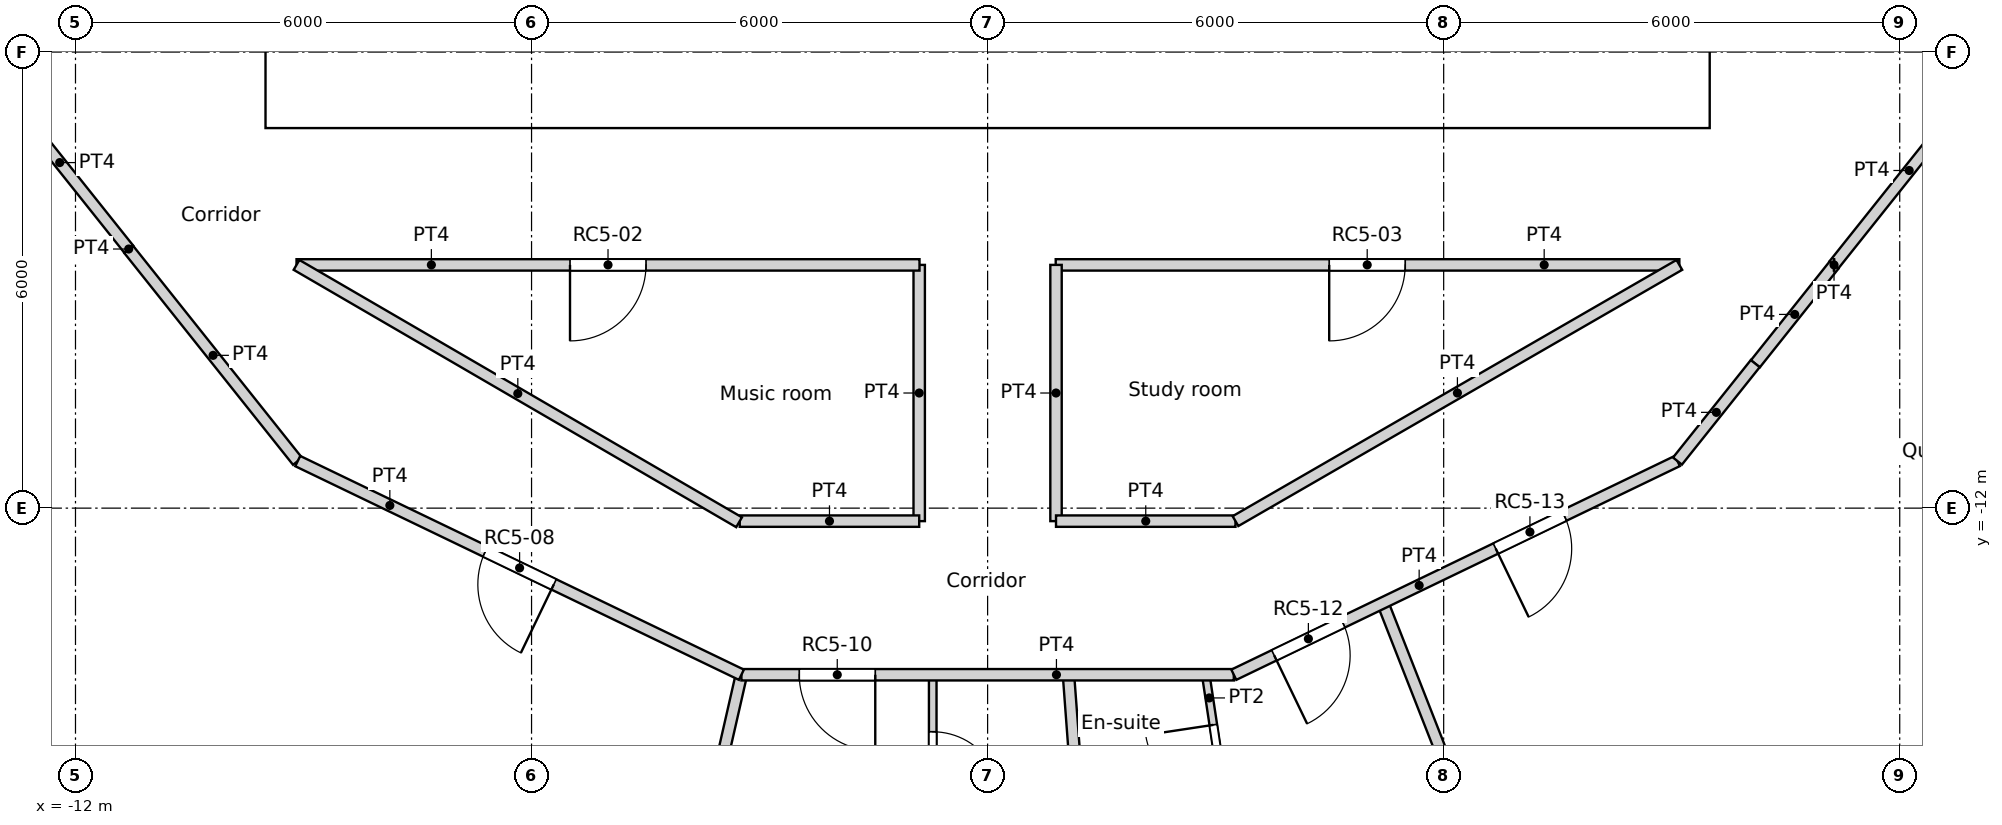
"""IFC4 building model, lengths in metres.
Left out: names, types, materials, properties, quantities, classifications, styles, units other than length and angle.
Written with IfcOpenShell. Run it as: python <this file> out.ifc"""

import sys

from ifc_helpers import new_model, si_unit, direction, frame, frame_2d, origin, origin_2d, place, context, subcontext, project, spatial, rectangle, circle, extrude, element, fill, save


model = new_model("IFC4")
c1 = context("Model", 3, precision=1e-05, world=origin(), true_north=direction((0.0, 1.0)))
c2 = subcontext(c1, "Body", "Model", "MODEL_VIEW")
j1 = project(units=[si_unit("LENGTHUNIT", "METRE"), si_unit("PLANEANGLEUNIT", "RADIAN")], contexts=[c1])
p1 = place(None, origin())
s1 = spatial("IfcSite", under=j1, at=p1, CompositionType="ELEMENT")
p2 = place(p1, origin())
s2 = spatial("IfcBuilding", under=s1, at=p2, CompositionType="ELEMENT")
p3 = place(p2, frame((0.0, 0.0, 270.6)))
s3 = spatial("IfcBuildingStorey", under=s2, at=p3, CompositionType="ELEMENT", Elevation=270.6)
p4 = place(p3, frame((11.735, -14.716, 0.0), z_axis=(0.0, 0.0, 1.0), x_axis=(1.0, 0.0, 0.0)))
e1 = element("IfcColumn", 1, at=p4, inside=s3, PredefinedType="COLUMN", context=c2, shape_type="SweptSolid", body=[
    extrude(circle(Radius=0.55, at=origin_2d()), origin(), (0.0, 0.0, 1.0), 3.6),
])
p5 = place(p3, frame((-9.5, -6.7, 0.0), z_axis=(0.0, 0.0, 1.0), x_axis=(1.0, 0.0, 0.0)))
e2 = element("IfcWall", 2, at=p5, inside=s3, PredefinedType="SOLIDWALL", context=c2, shape_type="SweptSolid", body=[
    extrude(rectangle(XDim=19.0, YDim=0.6, at=frame_2d((9.5, 0.0))), origin(), (0.0, 0.0, 1.0), 3.6),
])
p6 = place(p5, frame((10.4, 0.0, 0.0)))
e3 = element("IfcOpeningElement", 3, at=p6, cuts=e2, PredefinedType="OPENING", context=c2, shape_type="SweptSolid", body=[
    extrude(rectangle(XDim=1.0, YDim=2.1, at=frame_2d((0.5, 1.05))), frame((0.0, 0.3, 0.0), z_axis=(0.0, -1.0, 0.0), x_axis=(1.0, 0.0, 0.0)), (0.0, 0.0, 1.0), 0.6),
])
p7 = place(p5, frame((5.35, 0.0, 0.0)))
e4 = element("IfcOpeningElement", 4, at=p7, cuts=e2, PredefinedType="OPENING", context=c2, shape_type="SweptSolid", body=[
    extrude(rectangle(XDim=1.7, YDim=2.1, at=frame_2d((0.85, 1.05))), frame((0.0, 0.3, 0.0), z_axis=(0.0, -1.0, 0.0), x_axis=(1.0, 0.0, 0.0)), (0.0, 0.0, 1.0), 0.6),
])
p8 = place(p5, frame((11.95, 0.0, 0.0)))
e5 = element("IfcOpeningElement", 5, at=p8, cuts=e2, PredefinedType="OPENING", context=c2, shape_type="SweptSolid", body=[
    extrude(rectangle(XDim=1.7, YDim=2.1, at=frame_2d((0.85, 1.05))), frame((0.0, 0.3, 0.0), z_axis=(0.0, -1.0, 0.0), x_axis=(1.0, 0.0, 0.0)), (0.0, 0.0, 1.0), 0.6),
])
p9 = place(p3, frame((-9.2, -6.4, 0.0), z_axis=(0.0, 0.0, 1.0), x_axis=(0.0, 1.0, 0.0)))
e6 = element("IfcWall", 6, at=p9, inside=s3, PredefinedType="SOLIDWALL", context=c2, shape_type="SweptSolid", body=[
    extrude(rectangle(XDim=12.8, YDim=0.6, at=frame_2d((6.4, 0.0))), origin(), (0.0, 0.0, 1.0), 3.6),
])
p10 = place(p3, frame((9.2, -6.4, 0.0), z_axis=(0.0, 0.0, 1.0), x_axis=(0.0, 1.0, 0.0)))
e7 = element("IfcWall", 7, at=p10, inside=s3, PredefinedType="SOLIDWALL", context=c2, shape_type="SweptSolid", body=[
    extrude(rectangle(XDim=12.8, YDim=0.6, at=frame_2d((6.4, 0.0))), origin(), (0.0, 0.0, 1.0), 3.6),
])
p11 = place(p10, frame((6.4, 0.0, 0.0)))
e8 = element("IfcOpeningElement", 8, at=p11, cuts=e7, PredefinedType="OPENING", context=c2, shape_type="SweptSolid", body=[
    extrude(rectangle(XDim=1.8, YDim=2.1, at=frame_2d((0.9, 1.05))), frame((0.0, 0.3, 0.0), z_axis=(0.0, -1.0, 0.0), x_axis=(1.0, 0.0, 0.0)), (0.0, 0.0, 1.0), 0.6),
])
for number, where, z_axis, x_axis in (
    (9, (-2.25, -6.4, 0.0), (0.0, 0.0, 1.0), (0.0, 1.0, 0.0)),
    (10, (0.55, -6.4, 0.0), (0.0, 0.0, 1.0), (0.0, 1.0, 0.0)),
    (11, (2.25, -6.4, 0.0), (0.0, 0.0, 1.0), (0.0, 1.0, 0.0)),
):
    element("IfcWall", number, at=place(p3, frame(where, z_axis=z_axis, x_axis=x_axis)), inside=s3, PredefinedType="SOLIDWALL", context=c2, shape_type="SweptSolid", body=[
        extrude(rectangle(XDim=3.15, YDim=0.3, at=frame_2d((1.575, 0.0))), origin(), (0.0, 0.0, 1.0), 3.25),
    ])
p12 = place(p3, frame((-9.092, -8.8, 0.0), z_axis=(0.0, 0.0, 1.0), x_axis=(1.0, 0.0, 0.0)))
e12 = element("IfcWall", 12, at=p12, inside=s3, PredefinedType="PARTITIONING", context=c2, shape_type="SweptSolid", body=[
    extrude(rectangle(XDim=8.196, YDim=0.15, at=frame_2d((4.098, 0.0))), origin(), (0.0, 0.0, 1.0), 3.1),
])
p13 = place(p12, frame((3.598, 0.0, 0.0)))
e13 = element("IfcOpeningElement", 13, at=p13, cuts=e12, PredefinedType="OPENING", context=c2, shape_type="SweptSolid", body=[
    extrude(rectangle(XDim=1.0, YDim=2.04, at=frame_2d((0.5, 1.02))), frame((0.0, 0.075, 0.0), z_axis=(0.0, -1.0, 0.0), x_axis=(1.0, 0.0, 0.0)), (0.0, 0.0, 1.0), 0.15),
])
p14 = place(p3, frame((-9.092, -8.8, 0.0), z_axis=(0.0, 0.0, 1.0), x_axis=(0.864470922103, -0.502682827277, 0.0)))
e14 = element("IfcWall", 14, at=p14, inside=s3, PredefinedType="PARTITIONING", context=c2, shape_type="SweptSolid", body=[
    extrude(rectangle(XDim=6.735, YDim=0.15, at=frame_2d((3.368, 0.0))), origin(), (0.0, 0.0, 1.0), 3.1),
])
p15 = place(p3, frame((0.896, -8.8, 0.0), z_axis=(0.0, 0.0, 1.0), x_axis=(1.0, 0.0, 0.0)))
e15 = element("IfcWall", 15, at=p15, inside=s3, PredefinedType="PARTITIONING", context=c2, shape_type="SweptSolid", body=[
    extrude(rectangle(XDim=8.205, YDim=0.15, at=frame_2d((4.102, 0.0))), origin(), (0.0, 0.0, 1.0), 3.1),
])
p16 = place(p15, frame((3.598, 0.0, 0.0)))
e16 = element("IfcOpeningElement", 16, at=p16, cuts=e15, PredefinedType="OPENING", context=c2, shape_type="SweptSolid", body=[
    extrude(rectangle(XDim=1.0, YDim=2.04, at=frame_2d((0.5, 1.02))), frame((0.0, 0.075, 0.0), z_axis=(0.0, -1.0, 0.0), x_axis=(1.0, 0.0, 0.0)), (0.0, 0.0, 1.0), 0.15),
])
p17 = place(p3, frame((-11.3, -8.596, 0.0), z_axis=(0.0, 0.0, 1.0), x_axis=(0.623165080354, -0.782090328944, 0.0)))
e17 = element("IfcWall", 17, at=p17, inside=s3, PredefinedType="PARTITIONING", context=c2, shape_type="SweptSolid", body=[
    extrude(rectangle(XDim=3.564, YDim=0.15, at=frame_2d((1.782, 0.0))), origin(), (0.0, 0.0, 1.0), 3.1),
])
p18 = place(p3, frame((-11.3, -8.596, 0.0), z_axis=(0.0, 0.0, 1.0), x_axis=(0.0, 1.0, 0.0)))
e18 = element("IfcWall", 18, at=p18, inside=s3, PredefinedType="PARTITIONING", context=c2, shape_type="SweptSolid", body=[
    extrude(rectangle(XDim=0.01, YDim=0.15, at=frame_2d((0.005, 0.0))), origin(), (0.0, 0.0, 1.0), 3.1),
])
p19 = place(p3, frame((11.137, -8.8, 0.0), z_axis=(0.0, 0.0, 1.0), x_axis=(-1.0, 0.0, 0.0)))
e19 = element("IfcWall", 19, at=p19, inside=s3, PredefinedType="PARTITIONING", context=c2, shape_type="SweptSolid", body=[
    extrude(rectangle(XDim=0.003, YDim=0.15, at=frame_2d((0.001, 0.0))), origin(), (0.0, 0.0, 1.0), 3.1),
])
p20 = place(p3, frame((10.101, -10.101, 0.0), z_axis=(0.0, 0.0, 1.0), x_axis=(0.623098344652, 0.782143498913, 0.0)))
e20 = element("IfcWall", 20, at=p20, inside=s3, PredefinedType="PARTITIONING", context=c2, shape_type="SweptSolid", body=[
    extrude(rectangle(XDim=1.661, YDim=0.15, at=frame_2d((0.831, 0.0))), origin(), (0.0, 0.0, 1.0), 3.1),
])
p21 = place(p3, frame((11.134, -8.8, 0.0), z_axis=(0.0, 0.0, 1.0), x_axis=(0.623476099415, 0.781842409606, 0.0)))
e21 = element("IfcWall", 21, at=p21, inside=s3, PredefinedType="PARTITIONING", context=c2, shape_type="SweptSolid", body=[
    extrude(rectangle(XDim=3.177, YDim=0.15, at=frame_2d((1.589, 0.0))), origin(), (0.0, 0.0, 1.0), 3.1),
])
p22 = place(p3, frame((-13.115, -6.316, 0.0), z_axis=(0.0, 0.0, 1.0), x_axis=(0.623446514299, -0.781866001185, 0.0)))
e22 = element("IfcWall", 22, at=p22, inside=s3, PredefinedType="PARTITIONING", context=c2, shape_type="SweptSolid", body=[
    extrude(rectangle(XDim=2.911, YDim=0.15, at=frame_2d((1.456, 0.0))), origin(), (0.0, 0.0, 1.0), 3.1),
])
p23 = place(p3, frame((-3.261, -12.171, 0.0), z_axis=(0.0, 0.0, 1.0), x_axis=(1.0, 0.0, 0.0)))
e23 = element("IfcWall", 23, at=p23, inside=s3, PredefinedType="PARTITIONING", context=c2, shape_type="SweptSolid", body=[
    extrude(rectangle(XDim=2.361, YDim=0.15, at=frame_2d((1.181, 0.0))), origin(), (0.0, 0.0, 1.0), 3.1),
])
for number, where, z_axis, x_axis in (
    (24, (-0.9, -12.171, 0.0), (0.0, 0.0, 1.0), (0.0, 1.0, 0.0)),
    (25, (0.9, -12.171, 0.0), (0.0, 0.0, 1.0), (0.0, 1.0, 0.0)),
):
    element("IfcWall", number, at=place(p3, frame(where, z_axis=z_axis, x_axis=x_axis)), inside=s3, PredefinedType="PARTITIONING", context=c2, shape_type="SweptSolid", body=[
        extrude(rectangle(XDim=3.371, YDim=0.15, at=frame_2d((1.686, 0.0))), origin(), (0.0, 0.0, 1.0), 3.1),
    ])
p24 = place(p3, frame((0.9, -12.171, 0.0), z_axis=(0.0, 0.0, 1.0), x_axis=(1.0, 0.0, 0.0)))
e26 = element("IfcWall", 26, at=p24, inside=s3, PredefinedType="PARTITIONING", context=c2, shape_type="SweptSolid", body=[
    extrude(rectangle(XDim=2.361, YDim=0.15, at=frame_2d((1.181, 0.0))), origin(), (0.0, 0.0, 1.0), 3.1),
])
p25 = place(p3, frame((3.261, -12.171, 0.0), z_axis=(0.0, 0.0, 1.0), x_axis=(0.866066809554, 0.499928276245, 0.0)))
e27 = element("IfcWall", 27, at=p25, inside=s3, PredefinedType="PARTITIONING", context=c2, shape_type="SweptSolid", body=[
    extrude(rectangle(XDim=6.743, YDim=0.15, at=frame_2d((3.371, 0.0))), origin(), (0.0, 0.0, 1.0), 3.1),
])
p26 = place(p3, frame((-9.076, -11.381, 0.0), z_axis=(0.0, 0.0, 1.0), x_axis=(0.900976027191, -0.433868872388, 0.0)))
e28 = element("IfcWall", 28, at=p26, inside=s3, PredefinedType="PARTITIONING", context=c2, shape_type="SweptSolid", body=[
    extrude(rectangle(XDim=6.479, YDim=0.15, at=frame_2d((3.239, 0.0))), origin(), (0.0, 0.0, 1.0), 3.1),
])
p27 = place(p26, frame((2.74, 0.0, 0.0)))
e29 = element("IfcOpeningElement", 29, at=p27, cuts=e28, PredefinedType="OPENING", context=c2, shape_type="SweptSolid", body=[
    extrude(rectangle(XDim=1.0, YDim=2.04, at=frame_2d((0.5, 1.02))), frame((0.0, 0.075, 0.0), z_axis=(0.0, -1.0, 0.0), x_axis=(1.0, 0.0, 0.0)), (0.0, 0.0, 1.0), 0.15),
])
p28 = place(p3, frame((-3.239, -14.192, 0.0), z_axis=(0.0, 0.0, 1.0), x_axis=(1.0, 0.0, 0.0)))
e30 = element("IfcWall", 30, at=p28, inside=s3, PredefinedType="PARTITIONING", context=c2, shape_type="SweptSolid", body=[
    extrude(rectangle(XDim=6.478, YDim=0.15, at=frame_2d((3.239, 0.0))), origin(), (0.0, 0.0, 1.0), 3.1),
])
p29 = place(p28, frame((0.761, 0.0, 0.0)))
e31 = element("IfcOpeningElement", 31, at=p29, cuts=e30, PredefinedType="OPENING", context=c2, shape_type="SweptSolid", body=[
    extrude(rectangle(XDim=1.0, YDim=2.1, at=frame_2d((0.5, 1.05))), frame((0.0, 0.075, 0.0), z_axis=(0.0, -1.0, 0.0), x_axis=(1.0, 0.0, 0.0)), (0.0, 0.0, 1.0), 0.15),
])
p30 = place(p3, frame((3.239, -14.192, 0.0), z_axis=(0.0, 0.0, 1.0), x_axis=(0.900851590682, 0.434127183629, 0.0)))
e32 = element("IfcWall", 32, at=p30, inside=s3, PredefinedType="PARTITIONING", context=c2, shape_type="SweptSolid", body=[
    extrude(rectangle(XDim=6.479, YDim=0.15, at=frame_2d((3.239, 0.0))), origin(), (0.0, 0.0, 1.0), 3.1),
])
p31 = place(p30, frame((0.589, 0.0, 0.0)))
e33 = element("IfcOpeningElement", 33, at=p31, cuts=e32, PredefinedType="OPENING", context=c2, shape_type="SweptSolid", body=[
    extrude(rectangle(XDim=1.0, YDim=2.1, at=frame_2d((0.5, 1.05))), frame((0.0, 0.075, 0.0), z_axis=(0.0, -1.0, 0.0), x_axis=(1.0, 0.0, 0.0)), (0.0, 0.0, 1.0), 0.15),
])
p32 = place(p30, frame((3.825, 0.0, 0.0)))
e34 = element("IfcOpeningElement", 34, at=p32, cuts=e32, PredefinedType="OPENING", context=c2, shape_type="SweptSolid", body=[
    extrude(rectangle(XDim=1.0, YDim=2.04, at=frame_2d((0.5, 1.02))), frame((0.0, 0.075, 0.0), z_axis=(0.0, -1.0, 0.0), x_axis=(1.0, 0.0, 0.0)), (0.0, 0.0, 1.0), 0.15),
])
p33 = place(p3, frame((9.076, -11.381, 0.0), z_axis=(0.0, 0.0, 1.0), x_axis=(0.623805208652, 0.781579849829, 0.0)))
e35 = element("IfcWall", 35, at=p33, inside=s3, PredefinedType="PARTITIONING", context=c2, shape_type="SweptSolid", body=[
    extrude(rectangle(XDim=1.64, YDim=0.15, at=frame_2d((0.82, 0.0))), origin(), (0.0, 0.0, 1.0), 3.1),
])
p34 = place(p3, frame((-4.4, -19.276, 0.0), z_axis=(0.0, 0.0, 1.0), x_axis=(0.222612505682, 0.974907007008, 0.0)))
e36 = element("IfcWall", 36, at=p34, inside=s3, PredefinedType="PARTITIONING", context=c2, shape_type="SweptSolid", body=[
    extrude(rectangle(XDim=5.215, YDim=0.15, at=frame_2d((2.607, 0.0))), origin(), (0.0, 0.0, 1.0), 3.1),
])
p35 = place(p3, frame((-0.722, -16.592, 0.0), z_axis=(0.0, 0.0, 1.0), x_axis=(0.0, 1.0, 0.0)))
e37 = element("IfcWall", 37, at=p35, inside=s3, PredefinedType="PARTITIONING", context=c2, shape_type="SweptSolid", body=[
    extrude(rectangle(XDim=2.4, YDim=0.1, at=frame_2d((1.2, 0.0))), origin(), (0.0, 0.0, 1.0), 3.1),
])
p36 = place(p35, frame((0.75, 0.0, 0.0)))
e38 = element("IfcOpeningElement", 38, at=p36, cuts=e37, PredefinedType="OPENING", context=c2, shape_type="SweptSolid", body=[
    extrude(rectangle(XDim=0.9, YDim=2.04, at=frame_2d((0.45, 1.02))), frame((0.0, 0.05, 0.0), z_axis=(0.0, -1.0, 0.0), x_axis=(1.0, 0.0, 0.0)), (0.0, 0.0, 1.0), 0.1),
])
p37 = place(p3, frame((1.064, -14.192, 0.0), z_axis=(0.0, 0.0, 1.0), x_axis=(0.074353677934, -0.997231934195, 0.0)))
e39 = element("IfcWall", 39, at=p37, inside=s3, PredefinedType="PARTITIONING", context=c2, shape_type="SweptSolid", body=[
    extrude(rectangle(XDim=2.407, YDim=0.15, at=frame_2d((1.203, 0.0))), origin(), (0.0, 0.0, 1.0), 3.1),
])
p38 = place(p3, frame((2.87, -14.192, 0.0), z_axis=(0.0, 0.0, 1.0), x_axis=(0.148960349288, -0.988843169739, 0.0)))
e40 = element("IfcWall", 40, at=p38, inside=s3, PredefinedType="PARTITIONING", context=c2, shape_type="SweptSolid", body=[
    extrude(rectangle(XDim=2.234, YDim=0.1, at=frame_2d((1.117, 0.0))), origin(), (0.0, 0.0, 1.0), 3.1),
])
p39 = place(p38, frame((0.667, 0.0, 0.0)))
e41 = element("IfcOpeningElement", 41, at=p39, cuts=e40, PredefinedType="OPENING", context=c2, shape_type="SweptSolid", body=[
    extrude(rectangle(XDim=0.9, YDim=2.04, at=frame_2d((0.45, 1.02))), frame((0.0, 0.05, 0.0), z_axis=(0.0, -1.0, 0.0), x_axis=(1.0, 0.0, 0.0)), (0.0, 0.0, 1.0), 0.1),
])
p40 = place(p3, frame((5.199, -13.248, 0.0), z_axis=(0.0, 0.0, 1.0), x_axis=(0.365334662456, -0.930876245485, 0.0)))
e42 = element("IfcWall", 42, at=p40, inside=s3, PredefinedType="PARTITIONING", context=c2, shape_type="SweptSolid", body=[
    extrude(rectangle(XDim=5.54, YDim=0.15, at=frame_2d((2.77, 0.0))), origin(), (0.0, 0.0, 1.0), 3.1),
])
p41 = place(p6, origin())
e43 = element("IfcDoor", 43, at=p41, inside=s3, OperationType="SINGLE_SWING_LEFT", PredefinedType="DOOR", context=c2, shape_type="SweptSolid", body=[
    extrude(rectangle(XDim=1.0, YDim=2.1, at=frame_2d((0.5, 1.05))), frame((0.0, 0.025, 0.0), z_axis=(0.0, -1.0, 0.0), x_axis=(1.0, 0.0, 0.0)), (0.0, 0.0, 1.0), 0.05),
])
fill(e3, e43)
p42 = place(p7, origin())
e44 = element("IfcDoor", 44, at=p42, inside=s3, OperationType="DOUBLE_DOOR_SINGLE_SWING", PredefinedType="DOOR", context=c2, shape_type="SweptSolid", body=[
    extrude(rectangle(XDim=1.7, YDim=2.1, at=frame_2d((0.85, 1.05))), frame((0.0, 0.025, 0.0), z_axis=(0.0, -1.0, 0.0), x_axis=(1.0, 0.0, 0.0)), (0.0, 0.0, 1.0), 0.05),
])
fill(e4, e44)
p43 = place(p8, origin())
e45 = element("IfcDoor", 45, at=p43, inside=s3, OperationType="DOUBLE_DOOR_SINGLE_SWING", PredefinedType="DOOR", context=c2, shape_type="SweptSolid", body=[
    extrude(rectangle(XDim=1.7, YDim=2.1, at=frame_2d((0.85, 1.05))), frame((0.0, 0.025, 0.0), z_axis=(0.0, -1.0, 0.0), x_axis=(1.0, 0.0, 0.0)), (0.0, 0.0, 1.0), 0.05),
])
fill(e5, e45)
p44 = place(p13, origin())
e46 = element("IfcDoor", 46, at=p44, inside=s3, OperationType="SINGLE_SWING_RIGHT", PredefinedType="DOOR", context=c2, shape_type="SweptSolid", body=[
    extrude(rectangle(XDim=1.0, YDim=2.04, at=frame_2d((0.5, 1.02))), frame((0.0, 0.025, 0.0), z_axis=(0.0, -1.0, 0.0), x_axis=(1.0, 0.0, 0.0)), (0.0, 0.0, 1.0), 0.05),
])
fill(e13, e46)
p45 = place(p16, origin())
e47 = element("IfcDoor", 47, at=p45, inside=s3, OperationType="SINGLE_SWING_RIGHT", PredefinedType="DOOR", context=c2, shape_type="SweptSolid", body=[
    extrude(rectangle(XDim=1.0, YDim=2.04, at=frame_2d((0.5, 1.02))), frame((0.0, 0.025, 0.0), z_axis=(0.0, -1.0, 0.0), x_axis=(1.0, 0.0, 0.0)), (0.0, 0.0, 1.0), 0.05),
])
fill(e16, e47)
p46 = place(p27, origin())
e48 = element("IfcDoor", 48, at=p46, inside=s3, OperationType="SINGLE_SWING_LEFT", PredefinedType="DOOR", context=c2, shape_type="SweptSolid", body=[
    extrude(rectangle(XDim=1.0, YDim=2.04, at=frame_2d((0.5, 1.02))), frame((0.0, 0.025, 0.0), z_axis=(0.0, -1.0, 0.0), x_axis=(1.0, 0.0, 0.0)), (0.0, 0.0, 1.0), 0.05),
])
fill(e29, e48)
p47 = place(p36, origin())
e49 = element("IfcDoor", 49, at=p47, inside=s3, OperationType="SINGLE_SWING_RIGHT", PredefinedType="DOOR", context=c2, shape_type="SweptSolid", body=[
    extrude(rectangle(XDim=0.9, YDim=2.04, at=frame_2d((0.45, 1.02))), frame((0.0, 0.025, 0.0), z_axis=(0.0, -1.0, 0.0), x_axis=(1.0, 0.0, 0.0)), (0.0, 0.0, 1.0), 0.05),
])
fill(e38, e49)
p48 = place(p29, origin())
e50 = element("IfcDoor", 50, at=p48, inside=s3, OperationType="SINGLE_SWING_LEFT", PredefinedType="DOOR", context=c2, shape_type="SweptSolid", body=[
    extrude(rectangle(XDim=1.0, YDim=2.1, at=frame_2d((0.5, 1.05))), frame((0.0, 0.025, 0.0), z_axis=(0.0, -1.0, 0.0), x_axis=(1.0, 0.0, 0.0)), (0.0, 0.0, 1.0), 0.05),
])
fill(e31, e50)
p49 = place(p39, origin())
e51 = element("IfcDoor", 51, at=p49, inside=s3, OperationType="SINGLE_SWING_RIGHT", PredefinedType="DOOR", context=c2, shape_type="SweptSolid", body=[
    extrude(rectangle(XDim=0.9, YDim=2.04, at=frame_2d((0.45, 1.02))), frame((0.0, 0.025, 0.0), z_axis=(0.0, -1.0, 0.0), x_axis=(1.0, 0.0, 0.0)), (0.0, 0.0, 1.0), 0.05),
])
fill(e41, e51)
p50 = place(p31, origin())
e52 = element("IfcDoor", 52, at=p50, inside=s3, OperationType="SINGLE_SWING_RIGHT", PredefinedType="DOOR", context=c2, shape_type="SweptSolid", body=[
    extrude(rectangle(XDim=1.0, YDim=2.1, at=frame_2d((0.5, 1.05))), frame((0.0, 0.025, 0.0), z_axis=(0.0, -1.0, 0.0), x_axis=(1.0, 0.0, 0.0)), (0.0, 0.0, 1.0), 0.05),
])
fill(e33, e52)
p51 = place(p32, origin())
e53 = element("IfcDoor", 53, at=p51, inside=s3, OperationType="SINGLE_SWING_RIGHT", PredefinedType="DOOR", context=c2, shape_type="SweptSolid", body=[
    extrude(rectangle(XDim=1.0, YDim=2.04, at=frame_2d((0.5, 1.02))), frame((0.0, 0.025, 0.0), z_axis=(0.0, -1.0, 0.0), x_axis=(1.0, 0.0, 0.0)), (0.0, 0.0, 1.0), 0.05),
])
fill(e34, e53)
save(model, sys.argv[1])
